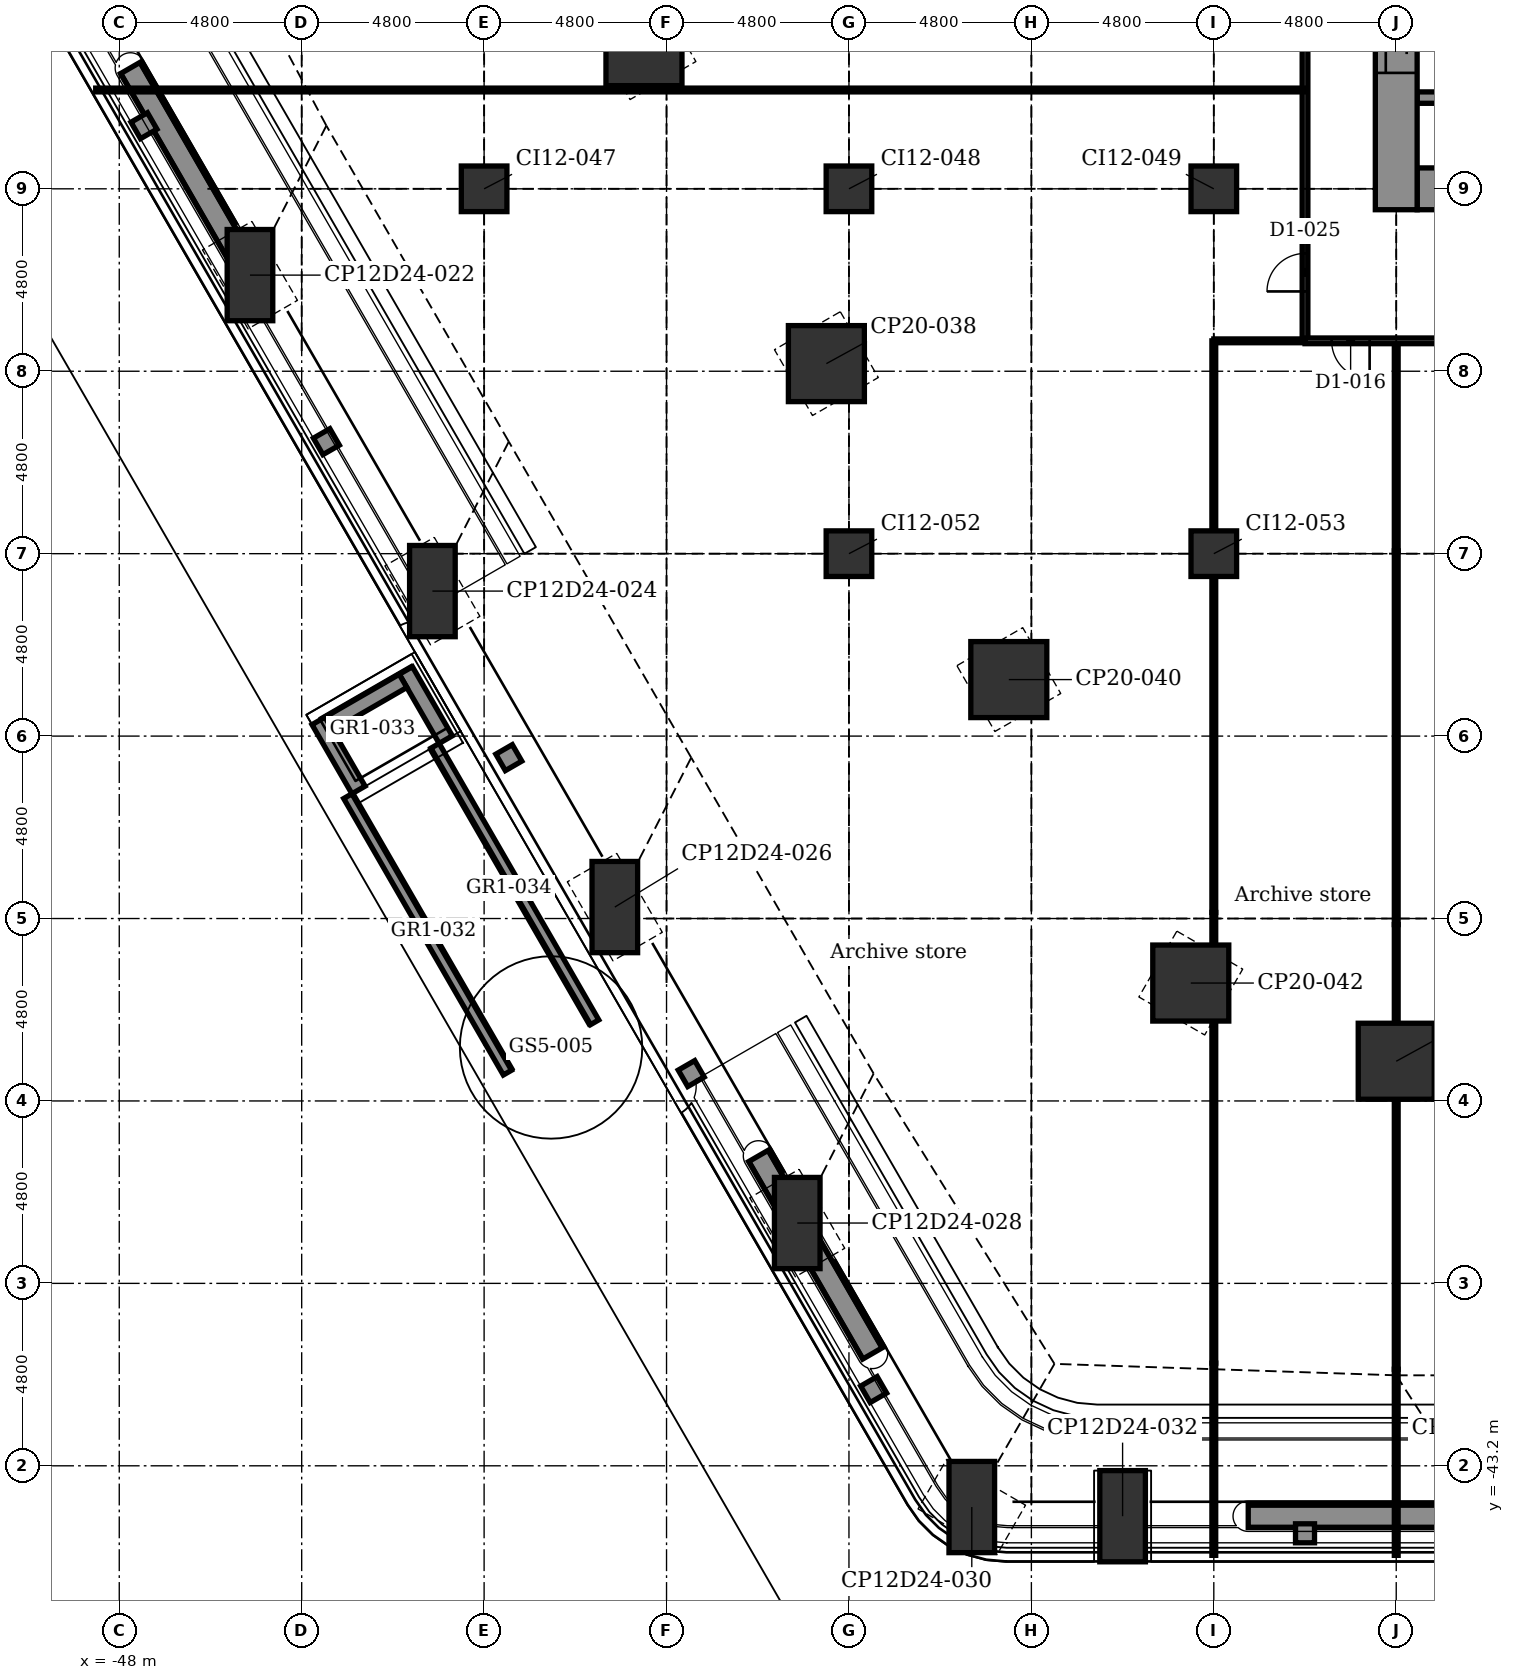
"""IFC4 building model, lengths in metres.
Left out: names, types, materials, properties, quantities, classifications, styles, units other than length and angle.
Written with IfcOpenShell. Run it as: python <this file> out.ifc"""

import sys

from ifc_helpers import new_model, si_unit, direction, frame, frame_2d, origin, origin_2d, place, context, subcontext, project, spatial, polyline, rectangle, outline, extrude, element, fill, save


model = new_model("IFC4")
c1 = context("Model", 3, precision=1e-05, world=origin(), true_north=direction((0.0, 1.0)))
c2 = subcontext(c1, "Body", "Model", "MODEL_VIEW")
j1 = project(units=[si_unit("LENGTHUNIT", "METRE"), si_unit("PLANEANGLEUNIT", "RADIAN")], contexts=[c1])
p1 = place(None, origin())
s1 = spatial("IfcSite", under=j1, at=p1, CompositionType="ELEMENT")
p2 = place(p1, origin())
s2 = spatial("IfcBuilding", under=s1, at=p2, CompositionType="ELEMENT")
p3 = place(p2, frame((0.0, 0.0, 7.0)))
s3 = spatial("IfcBuildingStorey", under=s2, at=p3, CompositionType="ELEMENT", Elevation=7.0)
for number, where, z_axis, x_axis in (
    (1, (-21.6, -44.526, -0.3), (0.0, 0.0, 1.0), (1.0, 0.0, 0.0)),
    (2, (-25.568, -44.285, -0.3), (0.0, 0.0, 1.0), (0.5, 0.866, 0.0)),
    (3, (-30.161, -36.812, -0.3), (0.0, 0.0, 1.0), (0.866, 0.5, 0.0)),
    (4, (-34.961, -28.499, -0.3), (0.0, 0.0, 1.0), (0.866, 0.5, 0.0)),
    (5, (-39.761, -20.185, -0.3), (0.0, 0.0, 1.0), (0.866, 0.5, 0.0)),
    (6, (-44.561, -11.871, -0.3), (0.0, 0.0, 1.0), (0.866, 0.5, 0.0)),
):
    element("IfcColumn", number, at=place(p3, frame(where, z_axis=z_axis, x_axis=x_axis)), inside=s3, PredefinedType="COLUMN", context=c2, shape_type="SweptSolid", body=[
        extrude(rectangle(XDim=1.2, YDim=2.4, at=origin_2d()), origin(), (0.0, 0.0, 1.0), 5.4),
    ])
for number, where, z_axis, x_axis in (
    (7, (-14.4, -32.555, -0.3), (0.0, 0.0, 1.0), (1.0, 0.0, 0.0)),
    (8, (-19.806, -30.498, -0.3), (0.0, 0.0, 1.0), (0.5, 0.866, 0.0)),
    (9, (-24.594, -22.513, -0.3), (0.0, 0.0, 1.0), (0.866, 0.5, 0.0)),
    (10, (-29.394, -14.199, -0.3), (0.0, 0.0, 1.0), (0.866, 0.5, 0.0)),
    (11, (-34.194, -5.885, -0.3), (0.0, 0.0, 1.0), (0.866, 0.5, 0.0)),
):
    element("IfcColumn", number, at=place(p3, frame(where, z_axis=z_axis, x_axis=x_axis)), inside=s3, PredefinedType="COLUMN", context=c2, shape_type="SweptSolid", body=[
        extrude(rectangle(XDim=2.0, YDim=2.0, at=origin_2d()), origin(), (0.0, 0.0, 1.0), 5.4),
    ])
for number, where, z_axis, x_axis in (
    (12, (-38.4, -9.6, -0.3), (0.0, 0.0, 1.0), (1.0, 0.0, 0.0)),
    (13, (-28.8, -19.2, -0.3), (0.0, 0.0, 1.0), (1.0, 0.0, 0.0)),
    (14, (-28.8, -9.6, -0.3), (0.0, 0.0, 1.0), (1.0, 0.0, 0.0)),
    (15, (-19.2, -19.2, -0.3), (0.0, 0.0, 1.0), (1.0, 0.0, 0.0)),
    (16, (-19.2, -9.6, -0.3), (0.0, 0.0, 1.0), (1.0, 0.0, 0.0)),
):
    element("IfcColumn", number, at=place(p3, frame(where, z_axis=z_axis, x_axis=x_axis)), inside=s3, PredefinedType="COLUMN", context=c2, shape_type="SweptSolid", body=[
        extrude(rectangle(XDim=1.2, YDim=1.2, at=origin_2d()), origin(), (0.0, 0.0, 1.0), 5.4),
    ])
p4 = place(p3, frame((-13.85, -9.6, -0.3), z_axis=(0.0, 0.0, 1.0), x_axis=(1.0, 0.0, 0.0)))
e17 = element("IfcWall", 17, at=p4, inside=s3, PredefinedType="SHEAR", context=c2, shape_type="SweptSolid", body=[
    extrude(rectangle(XDim=3.7, YDim=1.1, at=frame_2d((1.85, 0.0))), origin(), (0.0, 0.0, 1.0), 5.4),
])
p5 = place(p4, frame((1.4, 0.0, 0.3)))
e18 = element("IfcOpeningElement", 18, at=p5, cuts=e17, PredefinedType="OPENING", context=c2, shape_type="SweptSolid", body=[
    extrude(rectangle(XDim=0.9, YDim=2.1, at=frame_2d((0.45, 1.05))), frame((0.0, 0.56, 0.0), z_axis=(0.0, -1.0, 0.0), x_axis=(1.0, 0.0, 0.0)), (0.0, 0.0, 1.0), 1.12),
])
p6 = place(p3, frame((-13.85, -7.2, -0.3), z_axis=(0.0, 0.0, 1.0), x_axis=(1.0, 0.0, 0.0)))
e19 = element("IfcWall", 19, at=p6, inside=s3, PredefinedType="STANDARD", context=c2, shape_type="SweptSolid", body=[
    extrude(rectangle(XDim=3.7, YDim=0.3, at=frame_2d((1.85, 0.0))), origin(), (0.0, 0.0, 1.0), 5.4),
])
p7 = place(p3, frame((-14.4, -10.15, -0.3), z_axis=(0.0, 0.0, 1.0), x_axis=(0.0, 1.0, 0.0)))
e20 = element("IfcWall", 20, at=p7, inside=s3, PredefinedType="SHEAR", context=c2, shape_type="SweptSolid", body=[
    extrude(rectangle(XDim=20.3, YDim=1.1, at=frame_2d((10.15, 0.0))), origin(), (0.0, 0.0, 1.0), 5.4),
])
p8 = place(p7, frame((3.6, 0.0, 0.3)))
e21 = element("IfcOpeningElement", 21, at=p8, cuts=e20, PredefinedType="OPENING", context=c2, shape_type="SweptSolid", body=[
    extrude(rectangle(XDim=1.1, YDim=2.1, at=frame_2d((0.55, 1.05))), frame((0.0, 0.56, 0.0), z_axis=(0.0, -1.0, 0.0), x_axis=(1.0, 0.0, 0.0)), (0.0, 0.0, 1.0), 1.12),
])
p9 = place(p7, frame((6.0, 0.0, 0.3)))
e22 = element("IfcOpeningElement", 22, at=p9, cuts=e20, PredefinedType="OPENING", context=c2, shape_type="SweptSolid", body=[
    extrude(rectangle(XDim=1.1, YDim=2.1, at=frame_2d((0.55, 1.05))), frame((0.0, 0.56, 0.0), z_axis=(0.0, -1.0, 0.0), x_axis=(1.0, 0.0, 0.0)), (0.0, 0.0, 1.0), 1.12),
])
p10 = place(p7, frame((8.4, 0.0, 0.3)))
e23 = element("IfcOpeningElement", 23, at=p10, cuts=e20, PredefinedType="OPENING", context=c2, shape_type="SweptSolid", body=[
    extrude(rectangle(XDim=1.1, YDim=2.1, at=frame_2d((0.55, 1.05))), frame((0.0, 0.56, 0.0), z_axis=(0.0, -1.0, 0.0), x_axis=(1.0, 0.0, 0.0)), (0.0, 0.0, 1.0), 1.12),
])
p11 = place(p7, frame((10.8, 0.0, 0.3)))
e24 = element("IfcOpeningElement", 24, at=p11, cuts=e20, PredefinedType="OPENING", context=c2, shape_type="SweptSolid", body=[
    extrude(rectangle(XDim=1.1, YDim=2.1, at=frame_2d((0.55, 1.05))), frame((0.0, 0.56, 0.0), z_axis=(0.0, -1.0, 0.0), x_axis=(1.0, 0.0, 0.0)), (0.0, 0.0, 1.0), 1.12),
])
for number, where, z_axis, x_axis in (
    (25, (-12.294, -44.526, 5.4), (0.0, 0.0, 1.0), (-1.0, 0.0, 0.0)),
    (26, (-44.708, -11.616, 5.4), (0.0, 0.0, 1.0), (-0.5, 0.866, 0.0)),
    (27, (-28.18, -40.243, 5.4), (0.0, 0.0, 1.0), (-0.5, 0.866, 0.0)),
):
    element("IfcWall", number, at=place(p3, frame(where, z_axis=z_axis, x_axis=x_axis)), inside=s3, PredefinedType="USERDEFINED", context=c2, shape_type="SweptSolid", body=[
        extrude(rectangle(XDim=6.0, YDim=0.6, at=frame_2d((3.0, 0.0))), origin(), (0.0, 0.0, 1.0), 0.7),
    ])
for number, where, z_axis, x_axis in (
    (28, (-37.786, -32.855, 0.0), (0.0, 0.0, 1.0), (-0.5, 0.866, 0.0)),
    (29, (-35.491, -31.53, 0.0), (0.0, 0.0, 1.0), (-0.5, 0.866, 0.0)),
):
    element("IfcWall", number, at=place(p3, frame(where, z_axis=z_axis, x_axis=x_axis)), inside=s3, PredefinedType="SOLIDWALL", context=c2, shape_type="SweptSolid", body=[
        extrude(outline(polyline([(0.0, 0.0), (8.4, 0.0), (8.4, 5.5), (0.0, 0.274), (0.0, 0.0)])), frame((0.0, 0.125, 0.0), z_axis=(0.0, -1.0, 0.0), x_axis=(1.0, 0.0, 0.0)), (0.0, 0.0, 1.0), 0.25),
    ])
for number, where, z_axis, x_axis in (
    (30, (-41.705, -25.418, 0.45), (0.0, 0.0, 1.0), (-0.5, 0.866, 0.0)),
    (31, (-39.41, -24.093, 0.45), (0.0, 0.0, 1.0), (-0.5, 0.866, 0.0)),
):
    element("IfcWall", number, at=place(p3, frame(where, z_axis=z_axis, x_axis=x_axis)), inside=s3, PredefinedType="SOLIDWALL", context=c2, shape_type="SweptSolid", body=[
        extrude(rectangle(XDim=2.1, YDim=0.4, at=frame_2d((1.05, 0.0))), origin(), (0.0, 0.0, 1.0), 4.75),
    ])
p12 = place(p3, frame((-40.533, -22.547, 0.45), z_axis=(0.0, 0.0, 1.0), x_axis=(-0.866017533419, -0.500013631625, 0.0)))
e32 = element("IfcWall", 32, at=p12, inside=s3, PredefinedType="SOLIDWALL", context=c2, shape_type="SweptSolid", body=[
    extrude(rectangle(XDim=2.25, YDim=0.4, at=frame_2d((1.125, 0.0))), origin(), (0.0, 0.0, 1.0), 4.75),
])
p13 = place(p3, frame((-16.55, -44.976, 0.0), z_axis=(0.0, 0.0, 1.0), x_axis=(-1.0, 0.0, 0.0)))
e33 = element("IfcWall", 33, at=p13, inside=s3, PredefinedType="SOLIDWALL", context=c2, shape_type="SweptSolid", body=[
    extrude(rectangle(XDim=0.5, YDim=0.5, at=frame_2d((0.25, 0.0))), origin(), (0.0, 0.0, 1.0), 4.8),
])
for number, where, z_axis, x_axis in (
    (34, (-28.025, -41.41, 0.0), (0.0, 0.0, 1.0), (-0.5, 0.866, 0.0)),
    (35, (-32.825, -33.096, 0.0), (0.0, 0.0, 1.0), (-0.5, 0.866, 0.0)),
    (36, (-37.625, -24.783, 0.0), (0.0, 0.0, 1.0), (-0.5, 0.866, 0.0)),
):
    element("IfcWall", number, at=place(p3, frame(where, z_axis=z_axis, x_axis=x_axis)), inside=s3, PredefinedType="SOLIDWALL", context=c2, shape_type="SweptSolid", body=[
        extrude(rectangle(XDim=0.5, YDim=0.5, at=frame_2d((0.25, 0.0))), origin(), (0.0, 0.0, 1.0), 4.8),
    ])
for number, where, z_axis, x_axis in (
    (37, (-42.425, -16.469, 0.0), (0.0, 0.0, 1.0), (-0.5, 0.866, 0.0)),
    (38, (-47.225, -8.156, 0.0), (0.0, 0.0, 1.0), (-0.5, 0.866, 0.0)),
):
    element("IfcWall", number, at=place(p3, frame(where, z_axis=z_axis, x_axis=x_axis)), inside=s3, PredefinedType="SOLIDWALL", context=c2, shape_type="SweptSolid", body=[
        extrude(rectangle(XDim=0.5, YDim=0.5, at=frame_2d((0.25, 0.0))), origin(), (0.0, 0.0, 1.0), 4.8),
    ])
p14 = place(p3, frame((-14.4, -28.96, 0.0), z_axis=(0.0, 0.0, 1.0), x_axis=(0.0, 1.0, 0.0)))
e39 = element("IfcWall", 39, at=p14, inside=s3, PredefinedType="PARTITIONING", context=c2, shape_type="SweptSolid", body=[
    extrude(rectangle(XDim=9.834, YDim=0.1, at=frame_2d((4.917, 0.0))), origin(), (0.0, 0.0, 1.0), 4.643),
])
p15 = place(p3, frame((-14.4, -45.556, 0.0), z_axis=(0.0, 0.0, 1.0), x_axis=(0.0, 1.0, 0.0)))
e40 = element("IfcWall", 40, at=p15, inside=s3, PredefinedType="PARTITIONING", context=c2, shape_type="SweptSolid", body=[
    extrude(rectangle(XDim=4.897, YDim=0.1, at=frame_2d((2.448, 0.0))), origin(), (0.0, 0.0, 1.0), 5.1),
])
p16 = place(p3, frame((-14.4, -40.659, 0.0), z_axis=(0.0, 0.0, 1.0), x_axis=(0.0, 1.0, 0.0)))
e41 = element("IfcWall", 41, at=p16, inside=s3, PredefinedType="PARTITIONING", context=c2, shape_type="SweptSolid", body=[
    extrude(rectangle(XDim=7.144, YDim=0.1, at=frame_2d((3.572, 0.0))), origin(), (0.0, 0.0, 1.0), 4.745),
])
p17 = place(p3, frame((-14.4, -33.515, 0.0), z_axis=(0.0, 0.0, 1.0), x_axis=(0.0, 1.0, 0.0)))
e42 = element("IfcWall", 42, at=p17, inside=s3, PredefinedType="PARTITIONING", context=c2, shape_type="SweptSolid", body=[
    extrude(rectangle(XDim=1.92, YDim=0.1, at=frame_2d((0.96, 0.0))), origin(), (0.0, 0.0, 1.0), 5.1),
])
p18 = place(p3, frame((-14.4, -31.595, 0.0), z_axis=(0.0, 0.0, 1.0), x_axis=(0.0, 1.0, 0.0)))
e43 = element("IfcWall", 43, at=p18, inside=s3, PredefinedType="PARTITIONING", context=c2, shape_type="SweptSolid", body=[
    extrude(rectangle(XDim=2.635, YDim=0.1, at=frame_2d((1.318, 0.0))), origin(), (0.0, 0.0, 1.0), 4.79),
])
p19 = place(p3, frame((-14.4, -19.126, 0.0), z_axis=(0.0, 0.0, 1.0), x_axis=(0.0, 1.0, 0.0)))
e44 = element("IfcWall", 44, at=p19, inside=s3, PredefinedType="PARTITIONING", context=c2, shape_type="SweptSolid", body=[
    extrude(rectangle(XDim=5.526, YDim=0.1, at=frame_2d((2.763, 0.0))), origin(), (0.0, 0.0, 1.0), 4.693),
])
p20 = place(p3, frame((-16.8, -13.6, 0.0), z_axis=(0.0, 0.0, 1.0), x_axis=(0.0, 1.0, 0.0)))
e45 = element("IfcWall", 45, at=p20, inside=s3, PredefinedType="PARTITIONING", context=c2, shape_type="SweptSolid", body=[
    extrude(rectangle(XDim=9.65, YDim=0.15, at=frame_2d((4.825, 0.0))), origin(), (0.0, 0.0, 1.0), 5.1),
])
p21 = place(p20, frame((1.3, 0.0, 0.0)))
e46 = element("IfcOpeningElement", 46, at=p21, cuts=e45, PredefinedType="OPENING", context=c2, shape_type="SweptSolid", body=[
    extrude(rectangle(XDim=1.0, YDim=2.1, at=frame_2d((0.5, 1.05))), frame((0.0, 0.085, 0.0), z_axis=(0.0, -1.0, 0.0), x_axis=(1.0, 0.0, 0.0)), (0.0, 0.0, 1.0), 0.17),
])
p22 = place(p20, frame((7.7, 0.0, 0.0)))
e47 = element("IfcOpeningElement", 47, at=p22, cuts=e45, PredefinedType="OPENING", context=c2, shape_type="SweptSolid", body=[
    extrude(rectangle(XDim=1.0, YDim=2.1, at=frame_2d((0.5, 1.05))), frame((0.0, 0.085, 0.0), z_axis=(0.0, -1.0, 0.0), x_axis=(1.0, 0.0, 0.0)), (0.0, 0.0, 1.0), 0.17),
])
p23 = place(p3, frame((-19.2, -40.498, 0.0), z_axis=(0.0, 0.0, 1.0), x_axis=(0.0, 1.0, 0.0)))
e48 = element("IfcWall", 48, at=p23, inside=s3, PredefinedType="PARTITIONING", context=c2, shape_type="SweptSolid", body=[
    extrude(rectangle(XDim=9.09, YDim=0.1, at=frame_2d((4.545, 0.0))), origin(), (0.0, 0.0, 1.0), 4.643),
])
p24 = place(p3, frame((-19.2, -45.556, 0.0), z_axis=(0.0, 0.0, 1.0), x_axis=(0.0, 1.0, 0.0)))
e49 = element("IfcWall", 49, at=p24, inside=s3, PredefinedType="PARTITIONING", context=c2, shape_type="SweptSolid", body=[
    extrude(rectangle(XDim=5.058, YDim=0.1, at=frame_2d((2.529, 0.0))), origin(), (0.0, 0.0, 1.0), 5.1),
])
p25 = place(p3, frame((-19.2, -31.408, 0.0), z_axis=(0.0, 0.0, 1.0), x_axis=(0.0, 1.0, 0.0)))
e50 = element("IfcWall", 50, at=p25, inside=s3, PredefinedType="PARTITIONING", context=c2, shape_type="SweptSolid", body=[
    extrude(rectangle(XDim=2.769, YDim=0.1, at=frame_2d((1.384, 0.0))), origin(), (0.0, 0.0, 1.0), 5.1),
])
p26 = place(p3, frame((-19.2, -28.64, 0.0), z_axis=(0.0, 0.0, 1.0), x_axis=(0.0, 1.0, 0.0)))
e51 = element("IfcWall", 51, at=p26, inside=s3, PredefinedType="PARTITIONING", context=c2, shape_type="SweptSolid", body=[
    extrude(rectangle(XDim=8.88, YDim=0.1, at=frame_2d((4.44, 0.0))), origin(), (0.0, 0.0, 1.0), 4.693),
])
p27 = place(p3, frame((-19.2, -19.76, 0.0), z_axis=(0.0, 0.0, 1.0), x_axis=(0.0, 1.0, 0.0)))
e52 = element("IfcWall", 52, at=p27, inside=s3, PredefinedType="PARTITIONING", context=c2, shape_type="SweptSolid", body=[
    extrude(rectangle(XDim=1.12, YDim=0.1, at=frame_2d((0.56, 0.0))), origin(), (0.0, 0.0, 1.0), 5.1),
])
p28 = place(p3, frame((-19.2, -18.64, 0.0), z_axis=(0.0, 0.0, 1.0), x_axis=(0.0, 1.0, 0.0)))
e53 = element("IfcWall", 53, at=p28, inside=s3, PredefinedType="PARTITIONING", context=c2, shape_type="SweptSolid", body=[
    extrude(rectangle(XDim=5.04, YDim=0.1, at=frame_2d((2.52, 0.0))), origin(), (0.0, 0.0, 1.0), 4.693),
])
p29 = place(p3, frame((-19.2, -13.6, 0.0), z_axis=(0.0, 0.0, 1.0), x_axis=(1.0, 0.0, 0.0)))
e54 = element("IfcWall", 54, at=p29, inside=s3, PredefinedType="PARTITIONING", context=c2, shape_type="SweptSolid", body=[
    extrude(rectangle(XDim=2.4, YDim=0.1, at=frame_2d((1.2, 0.0))), origin(), (0.0, 0.0, 1.0), 5.1),
])
p30 = place(p3, frame((-16.8, -13.6, 0.0), z_axis=(0.0, 0.0, 1.0), x_axis=(1.0, 0.0, 0.0)))
e55 = element("IfcWall", 55, at=p30, inside=s3, PredefinedType="PARTITIONING", context=c2, shape_type="SweptSolid", body=[
    extrude(rectangle(XDim=33.6, YDim=0.15, at=frame_2d((16.8, 0.0))), origin(), (0.0, 0.0, 1.0), 5.1),
])
p31 = place(p30, frame((0.7, 0.0, 0.0)))
e56 = element("IfcOpeningElement", 56, at=p31, cuts=e55, PredefinedType="OPENING", context=c2, shape_type="SweptSolid", body=[
    extrude(rectangle(XDim=1.0, YDim=2.1, at=frame_2d((0.5, 1.05))), frame((0.0, 0.085, 0.0), z_axis=(0.0, -1.0, 0.0), x_axis=(1.0, 0.0, 0.0)), (0.0, 0.0, 1.0), 0.17),
])
p32 = place(p30, frame((4.3, 0.0, 0.0)))
e57 = element("IfcOpeningElement", 57, at=p32, cuts=e55, PredefinedType="OPENING", context=c2, shape_type="SweptSolid", body=[
    extrude(rectangle(XDim=1.0, YDim=2.1, at=frame_2d((0.5, 1.05))), frame((0.0, 0.085, 0.0), z_axis=(0.0, -1.0, 0.0), x_axis=(1.0, 0.0, 0.0)), (0.0, 0.0, 1.0), 0.17),
])
p33 = place(p30, frame((13.9, 0.0, 0.0)))
e58 = element("IfcOpeningElement", 58, at=p33, cuts=e55, PredefinedType="OPENING", context=c2, shape_type="SweptSolid", body=[
    extrude(rectangle(XDim=1.0, YDim=2.1, at=frame_2d((0.5, 1.05))), frame((0.0, 0.085, 0.0), z_axis=(0.0, -1.0, 0.0), x_axis=(1.0, 0.0, 0.0)), (0.0, 0.0, 1.0), 0.17),
])
p34 = place(p30, frame((23.5, 0.0, 0.0)))
e59 = element("IfcOpeningElement", 59, at=p34, cuts=e55, PredefinedType="OPENING", context=c2, shape_type="SweptSolid", body=[
    extrude(rectangle(XDim=1.0, YDim=2.1, at=frame_2d((0.5, 1.05))), frame((0.0, 0.085, 0.0), z_axis=(0.0, -1.0, 0.0), x_axis=(1.0, 0.0, 0.0)), (0.0, 0.0, 1.0), 0.17),
])
p35 = place(p30, frame((28.425, 0.0, 0.0)))
e60 = element("IfcOpeningElement", 60, at=p35, cuts=e55, PredefinedType="OPENING", context=c2, shape_type="SweptSolid", body=[
    extrude(rectangle(XDim=1.8, YDim=2.1, at=frame_2d((0.9, 1.05))), frame((0.0, 0.085, 0.0), z_axis=(0.0, -1.0, 0.0), x_axis=(1.0, 0.0, 0.0)), (0.0, 0.0, 1.0), 0.17),
])
p36 = place(p30, frame((31.9, 0.0, 0.0)))
e61 = element("IfcOpeningElement", 61, at=p36, cuts=e55, PredefinedType="OPENING", context=c2, shape_type="SweptSolid", body=[
    extrude(rectangle(XDim=1.0, YDim=2.1, at=frame_2d((0.5, 1.05))), frame((0.0, 0.085, 0.0), z_axis=(0.0, -1.0, 0.0), x_axis=(1.0, 0.0, 0.0)), (0.0, 0.0, 1.0), 0.17),
])
p37 = place(p3, frame((-48.62, -7.0, 0.0), z_axis=(0.0, 0.0, 1.0), x_axis=(1.0, 0.0, 0.0)))
e62 = element("IfcWall", 62, at=p37, inside=s3, PredefinedType="PARTITIONING", context=c2, shape_type="SweptSolid", body=[
    extrude(rectangle(XDim=31.82, YDim=0.1, at=frame_2d((15.91, 0.0))), origin(), (0.0, 0.0, 1.0), 5.1),
])
p38 = place(p31, frame((1.0, 0.0, 0.0), z_axis=(0.0, 0.0, 1.0), x_axis=(-1.0, 0.0, 0.0)))
e63 = element("IfcDoor", 63, at=p38, inside=s3, OperationType="SINGLE_SWING_RIGHT", PredefinedType="DOOR", context=c2, shape_type="SweptSolid", body=[
    extrude(rectangle(XDim=1.0, YDim=2.1, at=frame_2d((0.5, 1.05))), frame((0.0, 0.025, 0.0), z_axis=(0.0, -1.0, 0.0), x_axis=(1.0, 0.0, 0.0)), (0.0, 0.0, 1.0), 0.05),
])
fill(e56, e63)
p39 = place(p21, origin())
e64 = element("IfcDoor", 64, at=p39, inside=s3, OperationType="SINGLE_SWING_LEFT", PredefinedType="DOOR", context=c2, shape_type="SweptSolid", body=[
    extrude(rectangle(XDim=1.0, YDim=2.1, at=frame_2d((0.5, 1.05))), frame((0.0, 0.025, 0.0), z_axis=(0.0, -1.0, 0.0), x_axis=(1.0, 0.0, 0.0)), (0.0, 0.0, 1.0), 0.05),
])
fill(e46, e64)
p40 = place(p8, origin())
e65 = element("IfcDoor", 65, at=p40, inside=s3, OperationType="DOUBLE_DOOR_SLIDING", PredefinedType="DOOR", context=c2, shape_type="SweptSolid", body=[
    extrude(rectangle(XDim=1.1, YDim=2.1, at=frame_2d((0.55, 1.05))), frame((0.0, 0.025, 0.0), z_axis=(0.0, -1.0, 0.0), x_axis=(1.0, 0.0, 0.0)), (0.0, 0.0, 1.0), 0.05),
])
fill(e21, e65)
save(model, sys.argv[1])
